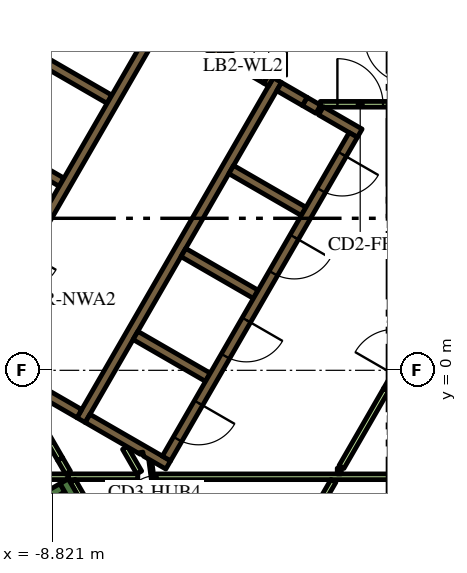
"""IFC4 building model, lengths in metres.
Left out: names, types, materials, properties, quantities, classifications, styles, units other than length and angle.
Written with IfcOpenShell. Run it as: python <this file> out.ifc"""

import sys

from ifc_helpers import new_model, si_unit, direction, frame, frame_2d, origin, place, context, subcontext, project, spatial, polyline, rectangle, outline, extrude, element, fill, save


model = new_model("IFC4")
c1 = context("Model", 3, precision=1e-05, world=origin(), true_north=direction((0.0, 1.0)))
c2 = subcontext(c1, "Body", "Model", "MODEL_VIEW")
j1 = project(units=[si_unit("LENGTHUNIT", "METRE"), si_unit("PLANEANGLEUNIT", "RADIAN")], contexts=[c1])
p1 = place(None, origin())
s1 = spatial("IfcSite", under=j1, at=p1, CompositionType="ELEMENT")
p2 = place(p1, origin())
s2 = spatial("IfcBuilding", under=s1, at=p2, CompositionType="ELEMENT")
p3 = place(p2, frame((0.0, 0.0, 54.9)))
s3 = spatial("IfcBuildingStorey", under=s2, at=p3, CompositionType="ELEMENT", Elevation=54.9)
p4 = place(p3, frame((-14.268, 0.387, 0.0), z_axis=(0.0, 0.0, 1.0), x_axis=(0.499994617707, 0.866028511231, 0.0)))
e1 = element("IfcWall", 1, at=p4, inside=s3, PredefinedType="SOLIDWALL", context=c2, shape_type="SweptSolid", body=[
    extrude(rectangle(XDim=18.817, YDim=0.9, at=frame_2d((9.409, 0.0))), origin(), (0.0, 0.0, 1.0), 3.9),
])
p5 = place(p3, frame((-14.44, -6.49, 0.0), z_axis=(0.0, 0.0, 1.0), x_axis=(0.866022966069, 0.500004222222, 0.0)))
e2 = element("IfcWall", 2, at=p5, inside=s3, PredefinedType="SOLIDWALL", context=c2, shape_type="SweptSolid", body=[
    extrude(rectangle(XDim=6.8, YDim=0.25, at=frame_2d((3.4, 0.0))), origin(), (0.0, 0.0, 1.0), 3.9),
])
p6 = place(p3, frame((-8.163, -3.511, 0.0), z_axis=(0.0, 0.0, 1.0), x_axis=(-0.500206266495, 0.865906283012, 0.0)))
e3 = element("IfcWall", 3, at=p6, inside=s3, PredefinedType="SOLIDWALL", context=c2, shape_type="SweptSolid", body=[
    extrude(rectangle(XDim=0.684, YDim=0.25, at=frame_2d((0.342, 0.0))), origin(), (0.0, 0.0, 1.0), 3.9),
])
p7 = place(p3, frame((-8.06, -1.311, 0.0), z_axis=(0.0, 0.0, 1.0), x_axis=(0.50000273126, 0.866023826885, 0.0)))
e4 = element("IfcWall", 4, at=p7, inside=s3, PredefinedType="SOLIDWALL", context=c2, shape_type="SweptSolid", body=[
    extrude(rectangle(XDim=10.33, YDim=0.25, at=frame_2d((5.165, 0.0))), origin(), (0.0, 0.0, 1.0), 3.9),
])
p8 = place(p3, frame((-1.819, 6.87, 0.0), z_axis=(0.0, 0.0, 1.0), x_axis=(-0.866294599386, 0.499533449405, 0.0)))
e5 = element("IfcWall", 5, at=p8, inside=s3, PredefinedType="SOLIDWALL", context=c2, shape_type="SweptSolid", body=[
    extrude(rectangle(XDim=0.41, YDim=0.25, at=frame_2d((0.205, 0.0))), origin(), (0.0, 0.0, 1.0), 3.9),
])
p9 = place(p3, frame((-2.849, 7.465, 0.0), z_axis=(0.0, 0.0, 1.0), x_axis=(0.865955664968, -0.500120771724, 0.0)))
e6 = element("IfcWall", 6, at=p9, inside=s3, PredefinedType="SOLIDWALL", context=c2, shape_type="SweptSolid", body=[
    extrude(rectangle(XDim=0.778, YDim=0.25, at=frame_2d((0.389, 0.0))), origin(), (0.0, 0.0, 1.0), 3.9),
])
p10 = place(p3, frame((-0.728, 6.24, 0.0), z_axis=(0.0, 0.0, 1.0), x_axis=(-0.866002680491, 0.500039355833, 0.0)))
e7 = element("IfcWall", 7, at=p10, inside=s3, PredefinedType="SOLIDWALL", context=c2, shape_type="SweptSolid", body=[
    extrude(rectangle(XDim=1.178, YDim=0.25, at=frame_2d((0.589, 0.0))), origin(), (0.0, 0.0, 1.0), 3.9),
])
for number, where, z_axis, x_axis in (
    (8, (-2.204, 4.182, 0.0), (0.0, 0.0, 1.0), (-0.866, 0.5, 0.0)),
    (9, (-5.369, 3.1, 0.0), (0.0, 0.0, 1.0), (0.866, -0.5, 0.0)),
    (10, (-4.724, -0.182, 0.0), (0.0, 0.0, 1.0), (-0.866, 0.5, 0.0)),
):
    element("IfcWall", number, at=place(p3, frame(where, z_axis=z_axis, x_axis=x_axis)), inside=s3, PredefinedType="SOLIDWALL", context=c2, shape_type="SweptSolid", body=[
        extrude(rectangle(XDim=2.2, YDim=0.25, at=frame_2d((1.1, 0.0))), origin(), (0.0, 0.0, 1.0), 3.9),
    ])
p11 = place(p3, origin())
e11 = element("IfcWall", 11, at=p11, inside=s3, PredefinedType="SOLIDWALL", context=c2, shape_type="SweptSolid", body=[
    extrude(outline(polyline([(-5.922, -2.257), (-5.922, -2.257), (-5.705, -2.382), (-5.83, -2.598), (-6.418, -2.258), (-6.433, -2.153), (-6.433, -2.153), (-6.433, -2.153), (-6.508, -2.163), (-6.508, -2.163), (-6.508, -2.163), (-6.501, -2.21), (-7.952, -1.373), (-7.827, -1.156), (-5.922, -2.257)])), origin(), (0.0, 0.0, 1.0), 3.9),
])
p12 = place(p3, frame((-9.265, -0.471, 0.0), z_axis=(0.0, 0.0, 1.0), x_axis=(0.865954634268, -0.500122556369, 0.0)))
e12 = element("IfcWall", 12, at=p12, inside=s3, PredefinedType="SOLIDWALL", context=c2, shape_type="SweptSolid", body=[
    extrude(rectangle(XDim=1.338, YDim=0.25, at=frame_2d((0.669, 0.0))), origin(), (0.0, 0.0, 1.0), 3.9),
])
e13 = element("IfcWall", 13, at=p11, inside=s3, PredefinedType="SOLIDWALL", context=c2, shape_type="SweptSolid", body=[
    extrude(outline(polyline([(-3.128, 7.481), (-3.259, 7.557), (-3.134, 7.773), (-3.003, 7.698), (-3.128, 7.481)])), origin(), (0.0, 0.0, 1.0), 3.9),
])
for number, where, z_axis, x_axis in (
    (14, (-8.574, 4.95, 0.0), (0.0, 0.0, 1.0), (-0.866, 0.5, 0.0)),
    (15, (-7.314, 7.132, 0.0), (0.0, 0.0, 1.0), (-0.866, 0.5, 0.0)),
):
    element("IfcWall", number, at=place(p3, frame(where, z_axis=z_axis, x_axis=x_axis)), inside=s3, PredefinedType="SOLIDWALL", context=c2, shape_type="SweptSolid", body=[
        extrude(rectangle(XDim=2.2, YDim=0.25, at=frame_2d((1.1, 0.0))), origin(), (0.0, 0.0, 1.0), 3.9),
    ])
p13 = place(p3, frame((-7.959, 10.415, 0.0), z_axis=(0.0, 0.0, 1.0), x_axis=(0.866020958405, -0.500007699544, 0.0)))
e16 = element("IfcWall", 16, at=p13, inside=s3, PredefinedType="SOLIDWALL", context=c2, shape_type="SweptSolid", body=[
    extrude(rectangle(XDim=4.1, YDim=0.25, at=frame_2d((2.05, 0.0))), origin(), (0.0, 0.0, 1.0), 3.9),
])
p14 = place(p3, frame((-8.395, -2.8, 0.0), z_axis=(0.0, 0.0, 1.0), x_axis=(1.0, 0.0, 0.0)))
e17 = element("IfcWall", 17, at=p14, inside=s3, PredefinedType="PARTITIONING", context=c2, shape_type="SweptSolid", body=[
    extrude(rectangle(XDim=1.828, YDim=0.15, at=frame_2d((0.914, 0.0))), origin(), (0.0, 0.0, 1.0), 2.75),
])
p15 = place(p3, frame((-11.115, -2.8, 0.0), z_axis=(0.0, 0.0, 1.0), x_axis=(1.0, 0.0, 0.0)))
e18 = element("IfcWall", 18, at=p15, inside=s3, PredefinedType="PARTITIONING", context=c2, shape_type="SweptSolid", body=[
    extrude(rectangle(XDim=2.708, YDim=0.15, at=frame_2d((1.354, 0.0))), origin(), (0.0, 0.0, 1.0), 2.75),
])
p16 = place(p3, frame((-6.531, -2.689, 0.0), z_axis=(0.0, 0.0, 1.0), x_axis=(-0.499967446111, 0.866044197965, 0.0)))
e19 = element("IfcWall", 19, at=p16, inside=s3, PredefinedType="PARTITIONING", context=c2, shape_type="SweptSolid", body=[
    extrude(rectangle(XDim=0.748, YDim=0.15, at=frame_2d((0.374, 0.0))), origin(), (0.0, 0.0, 1.0), 2.75),
])
p17 = place(p3, frame((-7.99, -3.412, 0.0), z_axis=(0.0, 0.0, 1.0), x_axis=(-0.500193841991, 0.86591346013, 0.0)))
e20 = element("IfcWall", 20, at=p17, inside=s3, PredefinedType="PARTITIONING", context=c2, shape_type="SweptSolid", body=[
    extrude(rectangle(XDim=0.583, YDim=0.15, at=frame_2d((0.292, 0.0))), origin(), (0.0, 0.0, 1.0), 2.75),
])
p18 = place(p3, frame((-8.612, -2.333, 0.0), z_axis=(0.0, 0.0, 1.0), x_axis=(0.500248216681, -0.86588204838, 0.0)))
e21 = element("IfcWall", 21, at=p18, inside=s3, PredefinedType="PARTITIONING", context=c2, shape_type="SweptSolid", body=[
    extrude(rectangle(XDim=0.415, YDim=0.15, at=frame_2d((0.208, 0.0))), origin(), (0.0, 0.0, 1.0), 2.75),
])
p19 = place(p3, frame((-6.086, -2.801, 0.0), z_axis=(0.0, 0.0, 1.0), x_axis=(1.0, 0.0, 0.0)))
e22 = element("IfcWall", 22, at=p19, inside=s3, PredefinedType="PARTITIONING", context=c2, shape_type="SweptSolid", body=[
    extrude(rectangle(XDim=7.524, YDim=0.15, at=frame_2d((3.762, 0.0))), origin(), (0.0, 0.0, 1.0), 2.75),
])
p20 = place(p3, frame((-1.887, -3.718, 0.0), z_axis=(0.0, 0.0, 1.0), x_axis=(0.499842898591, 0.866116087328, 0.0)))
e23 = element("IfcWall", 23, at=p20, inside=s3, PredefinedType="PARTITIONING", context=c2, shape_type="SweptSolid", body=[
    extrude(rectangle(XDim=0.936, YDim=0.15, at=frame_2d((0.468, 0.0))), origin(), (0.0, 0.0, 1.0), 2.75),
])
p21 = place(p3, frame((-1.212, -2.651, 0.0), z_axis=(0.0, 0.0, 1.0), x_axis=(-1.0, 0.0, 0.0)))
e24 = element("IfcWall", 24, at=p21, inside=s3, PredefinedType="PARTITIONING", context=c2, shape_type="SweptSolid", body=[
    extrude(rectangle(XDim=0.108, YDim=0.15, at=frame_2d((0.054, 0.0))), origin(), (0.0, 0.0, 1.0), 2.75),
])
p22 = place(p3, frame((-1.208, -2.544, 0.0), z_axis=(0.0, 0.0, 1.0), x_axis=(0.499995339376, 0.86602809458, 0.0)))
e25 = element("IfcWall", 25, at=p22, inside=s3, PredefinedType="PARTITIONING", context=c2, shape_type="SweptSolid", body=[
    extrude(rectangle(XDim=2.349, YDim=0.15, at=frame_2d((1.175, 0.0))), origin(), (0.0, 0.0, 1.0), 2.75),
])
p23 = place(p3, frame((-6.008, 9.144, 0.0), z_axis=(0.0, 0.0, 1.0), x_axis=(-0.500006956611, -0.866021387346, 0.0)))
e26 = element("IfcWall", 26, at=p23, inside=s3, PredefinedType="SOLIDWALL", context=c2, shape_type="SweptSolid", body=[
    extrude(rectangle(XDim=9.83, YDim=0.25, at=frame_2d((4.915, 0.0))), origin(), (0.0, 0.0, 1.0), 3.9),
])
p24 = place(p23, frame((6.985, 0.0, 0.0)))
e27 = element("IfcOpeningElement", 27, at=p24, cuts=e26, PredefinedType="OPENING", context=c2, shape_type="SweptSolid", body=[
    extrude(rectangle(XDim=0.9, YDim=2.1, at=frame_2d((0.45, 1.05))), frame((0.0, 0.135, 0.0), z_axis=(0.0, -1.0, 0.0), x_axis=(1.0, 0.0, 0.0)), (0.0, 0.0, 1.0), 0.27),
])
p25 = place(p3, frame((-0.898, 6.194, 0.0), z_axis=(0.0, 0.0, 1.0), x_axis=(-0.499996202215, -0.866027596426, 0.0)))
e28 = element("IfcWall", 28, at=p25, inside=s3, PredefinedType="SOLIDWALL", context=c2, shape_type="SweptSolid", body=[
    extrude(rectangle(XDim=9.83, YDim=0.25, at=frame_2d((4.915, 0.0))), origin(), (0.0, 0.0, 1.0), 3.9),
])
p26 = place(p25, frame((0.585, 0.0, 0.0)))
e29 = element("IfcOpeningElement", 29, at=p26, cuts=e28, PredefinedType="OPENING", context=c2, shape_type="SweptSolid", body=[
    extrude(rectangle(XDim=1.1, YDim=2.1, at=frame_2d((0.55, 1.05))), frame((0.0, 0.135, 0.0), z_axis=(0.0, -1.0, 0.0), x_axis=(1.0, 0.0, 0.0)), (0.0, 0.0, 1.0), 0.27),
])
p27 = place(p25, frame((3.105, 0.0, 0.0)))
e30 = element("IfcOpeningElement", 30, at=p27, cuts=e28, PredefinedType="OPENING", context=c2, shape_type="SweptSolid", body=[
    extrude(rectangle(XDim=1.1, YDim=2.1, at=frame_2d((0.55, 1.05))), frame((0.0, 0.135, 0.0), z_axis=(0.0, -1.0, 0.0), x_axis=(1.0, 0.0, 0.0)), (0.0, 0.0, 1.0), 0.27),
])
p28 = place(p25, frame((5.625, 0.0, 0.0)))
e31 = element("IfcOpeningElement", 31, at=p28, cuts=e28, PredefinedType="OPENING", context=c2, shape_type="SweptSolid", body=[
    extrude(rectangle(XDim=1.1, YDim=2.1, at=frame_2d((0.55, 1.05))), frame((0.0, 0.135, 0.0), z_axis=(0.0, -1.0, 0.0), x_axis=(1.0, 0.0, 0.0)), (0.0, 0.0, 1.0), 0.27),
])
p29 = place(p25, frame((8.145, 0.0, 0.0)))
e32 = element("IfcOpeningElement", 32, at=p29, cuts=e28, PredefinedType="OPENING", context=c2, shape_type="SweptSolid", body=[
    extrude(rectangle(XDim=1.1, YDim=2.1, at=frame_2d((0.55, 1.05))), frame((0.0, 0.135, 0.0), z_axis=(0.0, -1.0, 0.0), x_axis=(1.0, 0.0, 0.0)), (0.0, 0.0, 1.0), 0.27),
])
p30 = place(p3, frame((-1.765, 7.0, 0.0), z_axis=(0.0, 0.0, 1.0), x_axis=(1.0, 0.0, 0.0)))
e33 = element("IfcWall", 33, at=p30, inside=s3, PredefinedType="PARTITIONING", context=c2, shape_type="SweptSolid", body=[
    extrude(rectangle(XDim=2.1, YDim=0.15, at=frame_2d((1.05, 0.0))), origin(), (0.0, 0.0, 1.0), 2.75),
])
p31 = place(p30, frame((0.45, 0.0, 0.0)))
e34 = element("IfcOpeningElement", 34, at=p31, cuts=e33, PredefinedType="OPENING", context=c2, shape_type="SweptSolid", body=[
    extrude(rectangle(XDim=1.2, YDim=2.1, at=frame_2d((0.6, 1.05))), frame((0.0, 0.085, 0.0), z_axis=(0.0, -1.0, 0.0), x_axis=(1.0, 0.0, 0.0)), (0.0, 0.0, 1.0), 0.17),
])
p32 = place(p3, frame((-0.034, -0.509, 0.0), z_axis=(0.0, 0.0, 1.0), x_axis=(0.49994051562, 0.866059744384, 0.0)))
e35 = element("IfcWall", 35, at=p32, inside=s3, PredefinedType="PARTITIONING", context=c2, shape_type="SweptSolid", body=[
    extrude(rectangle(XDim=2.1, YDim=0.15, at=frame_2d((1.05, 0.0))), origin(), (0.0, 0.0, 1.0), 2.75),
])
p33 = place(p32, frame((0.45, 0.0, 0.0)))
e36 = element("IfcOpeningElement", 36, at=p33, cuts=e35, PredefinedType="OPENING", context=c2, shape_type="SweptSolid", body=[
    extrude(rectangle(XDim=1.2, YDim=2.1, at=frame_2d((0.6, 1.05))), frame((0.0, 0.085, 0.0), z_axis=(0.0, -1.0, 0.0), x_axis=(1.0, 0.0, 0.0)), (0.0, 0.0, 1.0), 0.17),
])
p34 = place(p3, frame((-5.995, -4.213, 0.0), z_axis=(0.0, 0.0, 1.0), x_axis=(-0.132072335448, 0.991240081014, 0.0)))
e37 = element("IfcWall", 37, at=p34, inside=s3, PredefinedType="PARTITIONING", context=c2, shape_type="SweptSolid", body=[
    extrude(rectangle(XDim=2.1, YDim=0.076, at=frame_2d((1.05, 0.0))), origin(), (0.0, 0.0, 1.0), 2.75),
])
p35 = place(p34, frame((0.55, 0.0, 0.0)))
e38 = element("IfcOpeningElement", 38, at=p35, cuts=e37, PredefinedType="OPENING", context=c2, shape_type="SweptSolid", body=[
    extrude(rectangle(XDim=0.9, YDim=2.1, at=frame_2d((0.45, 1.05))), frame((0.0, 0.048, 0.0), z_axis=(0.0, -1.0, 0.0), x_axis=(1.0, 0.0, 0.0)), (0.0, 0.0, 1.0), 0.096),
])
p36 = place(p3, frame((-4.409, 8.365, 0.0), z_axis=(0.0, 0.0, 1.0), x_axis=(0.866034573852, -0.49998411664, 0.0)))
e39 = element("IfcWall", 39, at=p36, inside=s3, PredefinedType="SOLIDWALL", context=c2, shape_type="SweptSolid", body=[
    extrude(rectangle(XDim=1.4, YDim=0.25, at=frame_2d((0.7, 0.0))), origin(), (0.0, 0.0, 1.0), 3.9),
])
p37 = place(p36, frame((0.1, 0.0, 0.0)))
e40 = element("IfcOpeningElement", 40, at=p37, cuts=e39, PredefinedType="OPENING", context=c2, shape_type="SweptSolid", body=[
    extrude(rectangle(XDim=1.2, YDim=2.1, at=frame_2d((0.6, 1.05))), frame((0.0, 0.135, 0.0), z_axis=(0.0, -1.0, 0.0), x_axis=(1.0, 0.0, 0.0)), (0.0, 0.0, 1.0), 0.27),
])
p38 = place(p3, frame((-8.612, -2.333, 0.0), z_axis=(0.0, 0.0, 1.0), x_axis=(-0.499961193289, 0.866047807691, 0.0)))
e41 = element("IfcWall", 41, at=p38, inside=s3, PredefinedType="PARTITIONING", context=c2, shape_type="SweptSolid", body=[
    extrude(rectangle(XDim=1.8, YDim=0.15, at=frame_2d((0.9, 0.0))), origin(), (0.0, 0.0, 1.0), 2.75),
])
p39 = place(p38, frame((0.45, 0.0, 0.0)))
e42 = element("IfcOpeningElement", 42, at=p39, cuts=e41, PredefinedType="OPENING", context=c2, shape_type="SweptSolid", body=[
    extrude(rectangle(XDim=0.9, YDim=2.1, at=frame_2d((0.45, 1.05))), frame((0.0, 0.085, 0.0), z_axis=(0.0, -1.0, 0.0), x_axis=(1.0, 0.0, 0.0)), (0.0, 0.0, 1.0), 0.17),
])
p40 = place(p3, frame((-19.081, -3.9, 0.0), z_axis=(0.0, 0.0, 1.0), x_axis=(0.499998313975, 0.866026377209, 0.0)))
e43 = element("IfcWall", 43, at=p40, inside=s3, PredefinedType="PARTITIONING", context=c2, shape_type="SweptSolid", body=[
    extrude(rectangle(XDim=25.766, YDim=0.15, at=frame_2d((12.883, 0.0))), origin(), (0.0, 0.0, 1.0), 2.75),
])
p41 = place(p40, frame((22.445, 0.0, 0.0)))
e44 = element("IfcOpeningElement", 44, at=p41, cuts=e43, PredefinedType="OPENING", context=c2, shape_type="SweptSolid", body=[
    extrude(rectangle(XDim=1.0, YDim=2.1, at=frame_2d((0.5, 1.05))), frame((0.0, 0.085, 0.0), z_axis=(0.0, -1.0, 0.0), x_axis=(1.0, 0.0, 0.0)), (0.0, 0.0, 1.0), 0.17),
])
p42 = place(p40, frame((21.138, 0.0, 0.0)))
e45 = element("IfcOpeningElement", 45, at=p42, cuts=e43, PredefinedType="OPENING", context=c2, shape_type="SweptSolid", body=[
    extrude(rectangle(XDim=1.0, YDim=2.1, at=frame_2d((0.5, 1.05))), frame((0.0, 0.085, 0.0), z_axis=(0.0, -1.0, 0.0), x_axis=(1.0, 0.0, 0.0)), (0.0, 0.0, 1.0), 0.17),
])
p43 = place(p40, frame((14.066, 0.0, 0.0)))
e46 = element("IfcOpeningElement", 46, at=p43, cuts=e43, PredefinedType="OPENING", context=c2, shape_type="SweptSolid", body=[
    extrude(rectangle(XDim=0.9, YDim=2.1, at=frame_2d((0.45, 1.05))), frame((0.0, 0.085, 0.0), z_axis=(0.0, -1.0, 0.0), x_axis=(1.0, 0.0, 0.0)), (0.0, 0.0, 1.0), 0.17),
])
p44 = place(p40, frame((11.693, 0.0, 0.0)))
e47 = element("IfcOpeningElement", 47, at=p44, cuts=e43, PredefinedType="OPENING", context=c2, shape_type="SweptSolid", body=[
    extrude(rectangle(XDim=1.0, YDim=2.1, at=frame_2d((0.5, 1.05))), frame((0.0, 0.085, 0.0), z_axis=(0.0, -1.0, 0.0), x_axis=(1.0, 0.0, 0.0)), (0.0, 0.0, 1.0), 0.17),
])
p45 = place(p26, origin())
e48 = element("IfcDoor", 48, at=p45, inside=s3, OperationType="DOUBLE_DOOR_SLIDING", PredefinedType="DOOR", context=c2, shape_type="SweptSolid", body=[
    extrude(rectangle(XDim=1.1, YDim=2.1, at=frame_2d((0.55, 1.05))), frame((0.0, 0.025, 0.0), z_axis=(0.0, -1.0, 0.0), x_axis=(1.0, 0.0, 0.0)), (0.0, 0.0, 1.0), 0.05),
])
fill(e29, e48)
p46 = place(p27, origin())
e49 = element("IfcDoor", 49, at=p46, inside=s3, OperationType="DOUBLE_DOOR_SLIDING", PredefinedType="DOOR", context=c2, shape_type="SweptSolid", body=[
    extrude(rectangle(XDim=1.1, YDim=2.1, at=frame_2d((0.55, 1.05))), frame((0.0, 0.025, 0.0), z_axis=(0.0, -1.0, 0.0), x_axis=(1.0, 0.0, 0.0)), (0.0, 0.0, 1.0), 0.05),
])
fill(e30, e49)
p47 = place(p28, origin())
e50 = element("IfcDoor", 50, at=p47, inside=s3, OperationType="DOUBLE_DOOR_SLIDING", PredefinedType="DOOR", context=c2, shape_type="SweptSolid", body=[
    extrude(rectangle(XDim=1.1, YDim=2.1, at=frame_2d((0.55, 1.05))), frame((0.0, 0.025, 0.0), z_axis=(0.0, -1.0, 0.0), x_axis=(1.0, 0.0, 0.0)), (0.0, 0.0, 1.0), 0.05),
])
fill(e31, e50)
p48 = place(p29, origin())
e51 = element("IfcDoor", 51, at=p48, inside=s3, OperationType="DOUBLE_DOOR_SLIDING", PredefinedType="DOOR", context=c2, shape_type="SweptSolid", body=[
    extrude(rectangle(XDim=1.1, YDim=2.1, at=frame_2d((0.55, 1.05))), frame((0.0, 0.025, 0.0), z_axis=(0.0, -1.0, 0.0), x_axis=(1.0, 0.0, 0.0)), (0.0, 0.0, 1.0), 0.05),
])
fill(e32, e51)
p49 = place(p31, origin())
e52 = element("IfcDoor", 52, at=p49, inside=s3, OperationType="SINGLE_SWING_LEFT", PredefinedType="DOOR", context=c2, shape_type="SweptSolid", body=[
    extrude(rectangle(XDim=1.2, YDim=2.1, at=frame_2d((0.6, 1.05))), frame((0.0, 0.025, 0.0), z_axis=(0.0, -1.0, 0.0), x_axis=(1.0, 0.0, 0.0)), (0.0, 0.0, 1.0), 0.05),
])
fill(e34, e52)
p50 = place(p35, origin())
e53 = element("IfcDoor", 53, at=p50, inside=s3, OperationType="SINGLE_SWING_LEFT", PredefinedType="DOOR", context=c2, shape_type="SweptSolid", body=[
    extrude(rectangle(XDim=0.9, YDim=2.1, at=frame_2d((0.45, 1.05))), frame((0.0, 0.025, 0.0), z_axis=(0.0, -1.0, 0.0), x_axis=(1.0, 0.0, 0.0)), (0.0, 0.0, 1.0), 0.05),
])
fill(e38, e53)
p51 = place(p37, origin())
e54 = element("IfcDoor", 54, at=p51, inside=s3, OperationType="SINGLE_SWING_LEFT", PredefinedType="DOOR", context=c2, shape_type="SweptSolid", body=[
    extrude(rectangle(XDim=1.2, YDim=2.1, at=frame_2d((0.6, 1.05))), frame((0.0, 0.025, 0.0), z_axis=(0.0, -1.0, 0.0), x_axis=(1.0, 0.0, 0.0)), (0.0, 0.0, 1.0), 0.05),
])
fill(e40, e54)
p52 = place(p39, origin())
e55 = element("IfcDoor", 55, at=p52, inside=s3, OperationType="SINGLE_SWING_LEFT", PredefinedType="DOOR", context=c2, shape_type="SweptSolid", body=[
    extrude(rectangle(XDim=0.9, YDim=2.1, at=frame_2d((0.45, 1.05))), frame((0.0, 0.025, 0.0), z_axis=(0.0, -1.0, 0.0), x_axis=(1.0, 0.0, 0.0)), (0.0, 0.0, 1.0), 0.05),
])
fill(e42, e55)
save(model, sys.argv[1])
